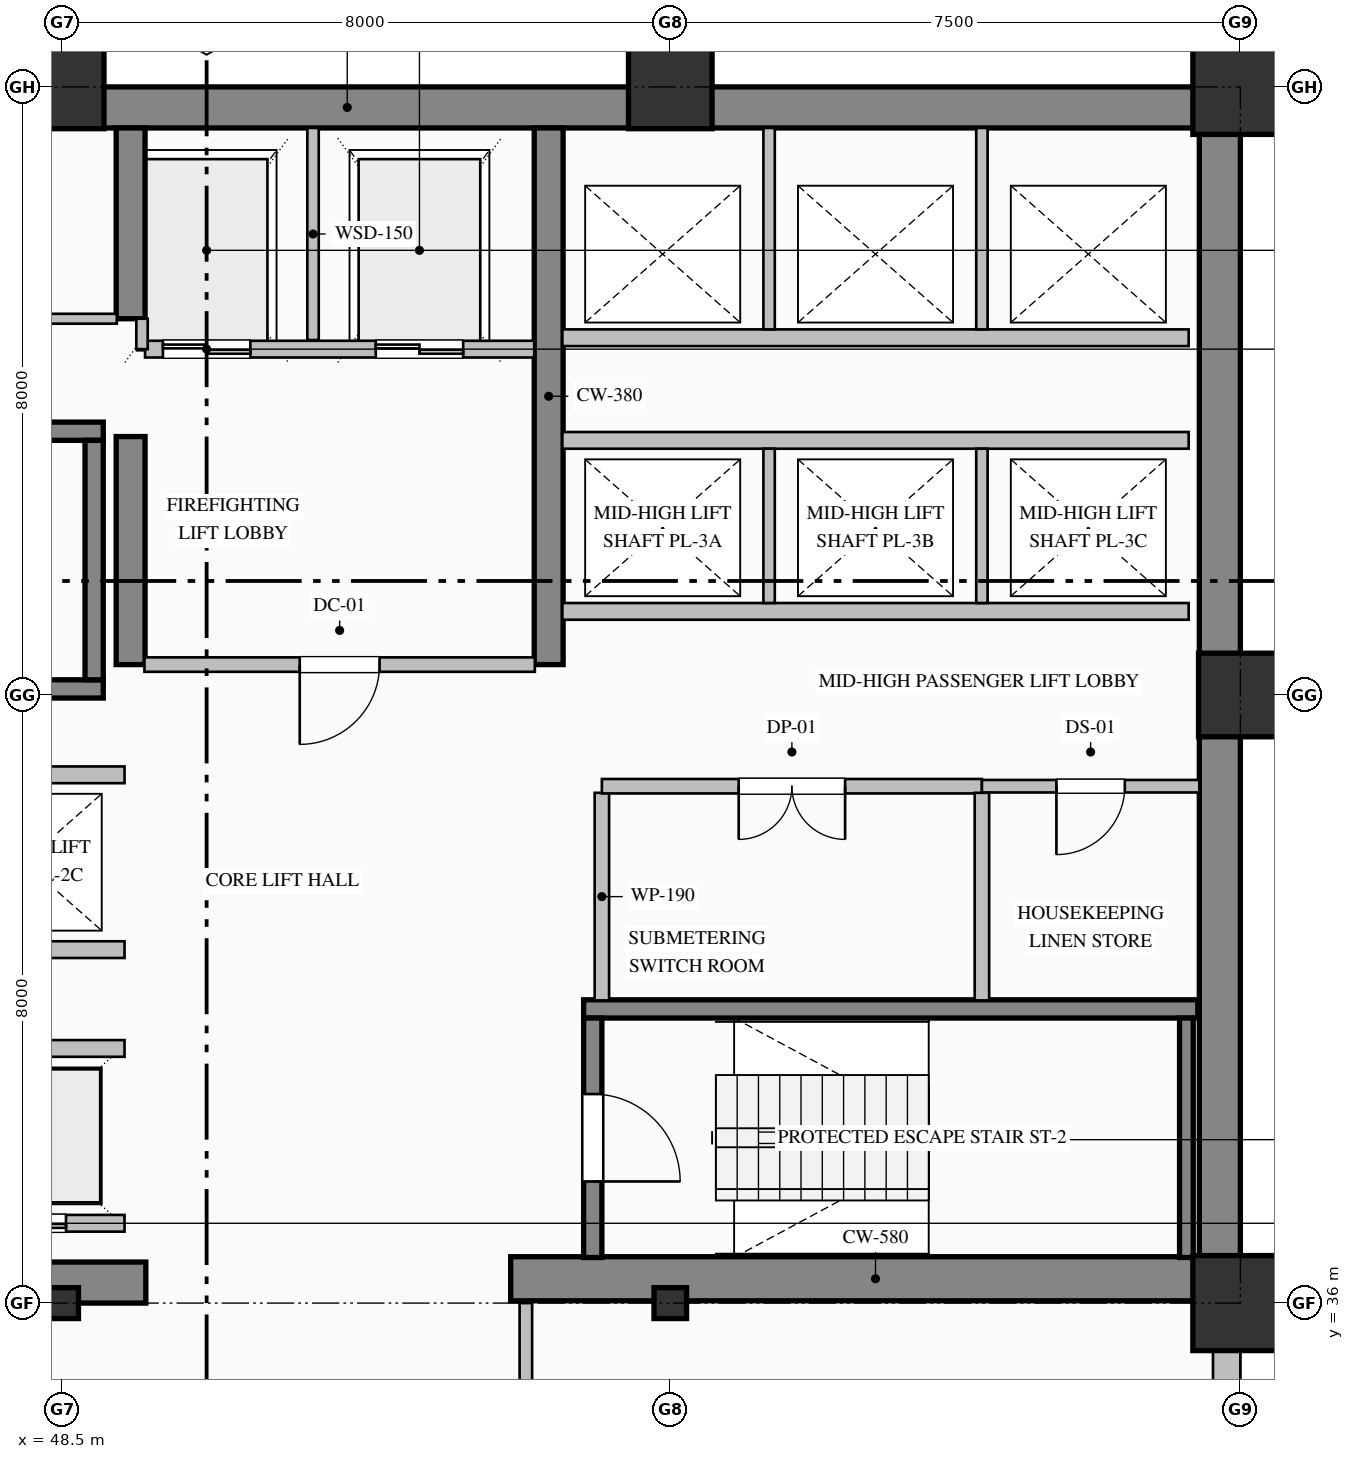
"""IFC4 building model, lengths in metres.
Left out: names, types, materials, properties, quantities, classifications, styles, units other than length and angle.
Written with IfcOpenShell. Run it as: python <this file> out.ifc"""

import sys

from ifc_helpers import new_model, si_unit, direction, frame, frame_2d, origin, origin_2d, place, context, subcontext, project, spatial, rectangle, hollow_rectangle, i_section, extrude, element, fill, save


model = new_model("IFC4")
c1 = context("Model", 3, precision=1e-05, world=origin(), true_north=direction((0.0, 1.0)))
c2 = subcontext(c1, "Body", "Model", "MODEL_VIEW")
j1 = project(units=[si_unit("LENGTHUNIT", "METRE"), si_unit("PLANEANGLEUNIT", "RADIAN")], contexts=[c1])
p1 = place(None, origin())
s1 = spatial("IfcSite", under=j1, at=p1, CompositionType="ELEMENT")
p2 = place(p1, origin())
s2 = spatial("IfcBuilding", under=s1, at=p2, CompositionType="ELEMENT")
p3 = place(p2, frame((0.0, 0.0, 80.2)))
s3 = spatial("IfcBuildingStorey", under=s2, at=p3, CompositionType="ELEMENT", Elevation=80.2)
p4 = place(p3, frame((40.5, 51.73, 0.0), z_axis=(0.0, 0.0, 1.0), x_axis=(1.0, 0.0, 0.0)))
e1 = element("IfcWall", 1, at=p4, inside=s3, PredefinedType="SHEAR", context=c2, shape_type="SweptSolid", body=[
    extrude(rectangle(XDim=23.5, YDim=0.54, at=frame_2d((11.75, 0.0))), origin(), (0.0, 0.0, 1.0), 3.75),
])
p5 = place(p3, frame((63.73, 36.32, 0.0), z_axis=(0.0, 0.0, 1.0), x_axis=(0.0, 1.0, 0.0)))
e2 = element("IfcWall", 2, at=p5, inside=s3, PredefinedType="SHEAR", context=c2, shape_type="SweptSolid", body=[
    extrude(rectangle(XDim=15.14, YDim=0.54, at=frame_2d((7.57, 0.0))), origin(), (0.0, 0.0, 1.0), 3.75),
])
p6 = place(p3, frame((48.2, 36.27, 0.0), z_axis=(0.0, 0.0, 1.0), x_axis=(1.0, 0.0, 0.0)))
e3 = element("IfcWall", 3, at=p6, inside=s3, PredefinedType="SHEAR", context=c2, shape_type="SweptSolid", body=[
    extrude(rectangle(XDim=1.4, YDim=0.54, at=frame_2d((0.7, 0.0))), origin(), (0.0, 0.0, 1.0), 3.75),
])
p7 = place(p3, frame((54.4, 36.32, 0.0), z_axis=(0.0, 0.0, 1.0), x_axis=(1.0, 0.0, 0.0)))
e4 = element("IfcWall", 4, at=p7, inside=s3, PredefinedType="SHEAR", context=c2, shape_type="SweptSolid", body=[
    extrude(rectangle(XDim=9.6, YDim=0.58, at=frame_2d((4.8, 0.0))), origin(), (0.0, 0.0, 1.0), 4.0),
])
p8 = place(p3, frame((49.4, 44.4, 0.0), z_axis=(0.0, 0.0, 1.0), x_axis=(0.0, 1.0, 0.0)))
e5 = element("IfcWall", 5, at=p8, inside=s3, PredefinedType="SHEAR", context=c2, shape_type="SweptSolid", body=[
    extrude(rectangle(XDim=3.0, YDim=0.38, at=frame_2d((1.5, 0.0))), origin(), (0.0, 0.0, 1.0), 3.75),
])
p9 = place(p3, frame((49.4, 48.95, 0.0), z_axis=(0.0, 0.0, 1.0), x_axis=(0.0, 1.0, 0.0)))
e6 = element("IfcWall", 6, at=p9, inside=s3, PredefinedType="SHEAR", context=c2, shape_type="SweptSolid", body=[
    extrude(rectangle(XDim=2.51, YDim=0.38, at=frame_2d((1.255, 0.0))), origin(), (0.0, 0.0, 1.0), 3.75),
])
p10 = place(p3, frame((54.9, 44.4, 0.0), z_axis=(0.0, 0.0, 1.0), x_axis=(0.0, 1.0, 0.0)))
e7 = element("IfcWall", 7, at=p10, inside=s3, PredefinedType="SHEAR", context=c2, shape_type="SweptSolid", body=[
    extrude(rectangle(XDim=7.06, YDim=0.38, at=frame_2d((3.53, 0.0))), origin(), (0.0, 0.0, 1.0), 3.75),
])
p11 = place(p3, frame((48.5, 36.0, 0.0), z_axis=(0.0, 0.0, 1.0), x_axis=(1.0, 0.0, 0.0)))
e8 = element("IfcColumn", 8, at=p11, inside=s3, PredefinedType="COLUMN", context=c2, shape_type="SweptSolid", body=[
    extrude(i_section(OverallWidth=0.407, OverallDepth=0.428, WebThickness=0.02, FlangeThickness=0.035, FilletRadius=0.022, at=origin_2d()), origin(), (0.0, 0.0, 1.0), 4.0),
])
p12 = place(p3, frame((48.5, 52.0, 0.0), z_axis=(0.0, 0.0, 1.0), x_axis=(1.0, 0.0, 0.0)))
e9 = element("IfcColumn", 9, at=p12, inside=s3, PredefinedType="COLUMN", context=c2, shape_type="SweptSolid", body=[
    extrude(hollow_rectangle(XDim=1.1, YDim=1.1, WallThickness=0.04, at=origin_2d()), origin(), (0.0, 0.0, 1.0), 4.0),
])
p13 = place(p3, frame((56.5, 36.0, 0.0), z_axis=(0.0, 0.0, 1.0), x_axis=(1.0, 0.0, 0.0)))
e10 = element("IfcColumn", 10, at=p13, inside=s3, PredefinedType="COLUMN", context=c2, shape_type="SweptSolid", body=[
    extrude(i_section(OverallWidth=0.407, OverallDepth=0.428, WebThickness=0.02, FlangeThickness=0.035, FilletRadius=0.022, at=origin_2d()), origin(), (0.0, 0.0, 1.0), 4.0),
])
p14 = place(p3, frame((56.5, 52.0, 0.0), z_axis=(0.0, 0.0, 1.0), x_axis=(1.0, 0.0, 0.0)))
e11 = element("IfcColumn", 11, at=p14, inside=s3, PredefinedType="COLUMN", context=c2, shape_type="SweptSolid", body=[
    extrude(hollow_rectangle(XDim=1.1, YDim=1.1, WallThickness=0.04, at=origin_2d()), origin(), (0.0, 0.0, 1.0), 4.0),
])
p15 = place(p3, frame((64.0, 36.0, 0.0), z_axis=(0.0, 0.0, 1.0), x_axis=(1.0, 0.0, 0.0)))
e12 = element("IfcColumn", 12, at=p15, inside=s3, PredefinedType="COLUMN", context=c2, shape_type="SweptSolid", body=[
    extrude(hollow_rectangle(XDim=1.25, YDim=1.25, WallThickness=0.045, at=origin_2d()), origin(), (0.0, 0.0, 1.0), 4.0),
])
p16 = place(p3, frame((64.0, 44.0, 0.0), z_axis=(0.0, 0.0, 1.0), x_axis=(1.0, 0.0, 0.0)))
e13 = element("IfcColumn", 13, at=p16, inside=s3, PredefinedType="COLUMN", context=c2, shape_type="SweptSolid", body=[
    extrude(hollow_rectangle(XDim=1.1, YDim=1.1, WallThickness=0.04, at=origin_2d()), origin(), (0.0, 0.0, 1.0), 4.0),
])
p17 = place(p3, frame((64.0, 52.0, 0.0), z_axis=(0.0, 0.0, 1.0), x_axis=(1.0, 0.0, 0.0)))
e14 = element("IfcColumn", 14, at=p17, inside=s3, PredefinedType="COLUMN", context=c2, shape_type="SweptSolid", body=[
    extrude(hollow_rectangle(XDim=1.25, YDim=1.25, WallThickness=0.045, at=origin_2d()), origin(), (0.0, 0.0, 1.0), 4.0),
])
p18 = place(p3, frame((63.82, 36.05, 0.0), z_axis=(0.0, 0.0, 1.0), x_axis=(0.0, -1.0, 0.0)))
e15 = element("IfcWall", 15, at=p18, inside=s3, PredefinedType="SOLIDWALL", context=c2, shape_type="SweptSolid", body=[
    extrude(rectangle(XDim=28.05, YDim=0.36, at=frame_2d((14.025, 0.0))), origin(), (0.0, 0.0, 1.0), 3.25),
])
p19 = place(p18, frame((2.55, 0.0, 0.85)))
e16 = element("IfcOpeningElement", 16, at=p19, cuts=e15, PredefinedType="OPENING", context=c2, shape_type="SweptSolid", body=[
    extrude(rectangle(XDim=2.1, YDim=2.05, at=frame_2d((1.05, 1.025))), frame((0.0, 0.19, 0.0), z_axis=(0.0, -1.0, 0.0), x_axis=(1.0, 0.0, 0.0)), (0.0, 0.0, 1.0), 0.38),
])
p20 = place(p18, frame((13.35, 0.0, 0.85)))
e17 = element("IfcOpeningElement", 17, at=p20, cuts=e15, PredefinedType="OPENING", context=c2, shape_type="SweptSolid", body=[
    extrude(rectangle(XDim=2.1, YDim=2.05, at=frame_2d((1.05, 1.025))), frame((0.0, 0.19, 0.0), z_axis=(0.0, -1.0, 0.0), x_axis=(1.0, 0.0, 0.0)), (0.0, 0.0, 1.0), 0.38),
])
for number, where, z_axis, x_axis in (
    (18, (40.96, 47.47, 0.0), (0.0, 0.0, 1.0), (1.0, 0.0, 0.0)),
    (19, (49.04, 44.08, 0.0), (0.0, 0.0, 1.0), (-1.0, 0.0, 0.0)),
):
    element("IfcWall", number, at=place(p3, frame(where, z_axis=z_axis, x_axis=x_axis)), inside=s3, PredefinedType="SOLIDWALL", context=c2, shape_type="SweptSolid", body=[
        extrude(rectangle(XDim=8.08, YDim=0.24, at=frame_2d((4.04, 0.0))), origin(), (0.0, 0.0, 1.0), 4.0),
    ])
p21 = place(p3, frame((48.92, 44.2, 0.0), z_axis=(0.0, 0.0, 1.0), x_axis=(0.0, 1.0, 0.0)))
e20 = element("IfcWall", 20, at=p21, inside=s3, PredefinedType="SOLIDWALL", context=c2, shape_type="SweptSolid", body=[
    extrude(rectangle(XDim=3.15, YDim=0.24, at=frame_2d((1.575, 0.0))), origin(), (0.0, 0.0, 1.0), 4.0),
])
p22 = place(p3, frame((55.36, 39.87, 0.0), z_axis=(0.0, 0.0, 1.0), x_axis=(1.0, 0.0, 0.0)))
e21 = element("IfcWall", 21, at=p22, inside=s3, PredefinedType="SOLIDWALL", context=c2, shape_type="SweptSolid", body=[
    extrude(rectangle(XDim=8.08, YDim=0.24, at=frame_2d((4.04, 0.0))), origin(), (0.0, 0.0, 1.0), 4.0),
])
p23 = place(p3, frame((55.48, 39.75, 0.0), z_axis=(0.0, 0.0, 1.0), x_axis=(0.0, -1.0, 0.0)))
e22 = element("IfcWall", 22, at=p23, inside=s3, PredefinedType="SOLIDWALL", context=c2, shape_type="SweptSolid", body=[
    extrude(rectangle(XDim=3.15, YDim=0.24, at=frame_2d((1.575, 0.0))), origin(), (0.0, 0.0, 1.0), 4.0),
])
p24 = place(p23, frame((1.0, 0.0, 0.0)))
e23 = element("IfcOpeningElement", 23, at=p24, cuts=e22, PredefinedType="OPENING", context=c2, shape_type="SweptSolid", body=[
    extrude(rectangle(XDim=1.15, YDim=2.2, at=frame_2d((0.575, 1.1))), frame((0.0, 0.13, 0.0), z_axis=(0.0, -1.0, 0.0), x_axis=(1.0, 0.0, 0.0)), (0.0, 0.0, 1.0), 0.26),
])
p25 = place(p3, frame((63.29, 36.6, 0.0), z_axis=(0.0, 0.0, 1.0), x_axis=(0.0, 1.0, 0.0)))
e24 = element("IfcWall", 24, at=p25, inside=s3, PredefinedType="SOLIDWALL", context=c2, shape_type="SweptSolid", body=[
    extrude(rectangle(XDim=3.15, YDim=0.18, at=frame_2d((1.575, 0.0))), origin(), (0.0, 0.0, 1.0), 4.0),
])
p26 = place(p3, frame((54.71, 48.55, 0.0), z_axis=(0.0, 0.0, 1.0), x_axis=(-1.0, 0.0, 0.0)))
e25 = element("IfcWall", 25, at=p26, inside=s3, PredefinedType="PARTITIONING", context=c2, shape_type="SweptSolid", body=[
    extrude(rectangle(XDim=5.12, YDim=0.22, at=frame_2d((2.56, 0.0))), origin(), (0.0, 0.0, 1.0), 3.75),
])
p27 = place(p26, frame((3.735, 0.0, 0.0)))
e26 = element("IfcOpeningElement", 26, at=p27, cuts=e25, PredefinedType="OPENING", context=c2, shape_type="SweptSolid", body=[
    extrude(rectangle(XDim=1.15, YDim=2.2, at=frame_2d((0.575, 1.1))), frame((0.0, 0.12, 0.0), z_axis=(0.0, -1.0, 0.0), x_axis=(1.0, 0.0, 0.0)), (0.0, 0.0, 1.0), 0.24),
])
p28 = place(p26, frame((0.935, 0.0, 0.0)))
e27 = element("IfcOpeningElement", 27, at=p28, cuts=e25, PredefinedType="OPENING", context=c2, shape_type="SweptSolid", body=[
    extrude(rectangle(XDim=1.15, YDim=2.2, at=frame_2d((0.575, 1.1))), frame((0.0, 0.12, 0.0), z_axis=(0.0, -1.0, 0.0), x_axis=(1.0, 0.0, 0.0)), (0.0, 0.0, 1.0), 0.24),
])
p29 = place(p3, frame((51.8, 48.67, 0.0), z_axis=(0.0, 0.0, 1.0), x_axis=(0.0, 1.0, 0.0)))
e28 = element("IfcWall", 28, at=p29, inside=s3, PredefinedType="PARTITIONING", context=c2, shape_type="SweptSolid", body=[
    extrude(rectangle(XDim=2.79, YDim=0.15, at=frame_2d((1.395, 0.0))), origin(), (0.0, 0.0, 1.0), 3.75),
])
p30 = place(p3, frame((49.55, 48.55, 0.0), z_axis=(0.0, 0.0, 1.0), x_axis=(0.0, 1.0, 0.0)))
e29 = element("IfcWall", 29, at=p30, inside=s3, PredefinedType="PARTITIONING", context=c2, shape_type="SweptSolid", body=[
    extrude(rectangle(XDim=0.4, YDim=0.15, at=frame_2d((0.2, 0.0))), origin(), (0.0, 0.0, 1.0), 3.75),
])
p31 = place(p3, frame((49.32, 37.05, 0.0), z_axis=(0.0, 0.0, 1.0), x_axis=(-1.0, 0.0, 0.0)))
e30 = element("IfcWall", 30, at=p31, inside=s3, PredefinedType="PARTITIONING", context=c2, shape_type="SweptSolid", body=[
    extrude(rectangle(XDim=8.24, YDim=0.22, at=frame_2d((4.12, 0.0))), origin(), (0.0, 0.0, 1.0), 3.75),
])
p32 = place(p31, frame((6.37, 0.0, 0.0)))
e31 = element("IfcOpeningElement", 31, at=p32, cuts=e30, PredefinedType="OPENING", context=c2, shape_type="SweptSolid", body=[
    extrude(rectangle(XDim=1.1, YDim=2.2, at=frame_2d((0.55, 1.1))), frame((0.0, 0.12, 0.0), z_axis=(0.0, -1.0, 0.0), x_axis=(1.0, 0.0, 0.0)), (0.0, 0.0, 1.0), 0.24),
])
p33 = place(p31, frame((3.57, 0.0, 0.0)))
e32 = element("IfcOpeningElement", 32, at=p33, cuts=e30, PredefinedType="OPENING", context=c2, shape_type="SweptSolid", body=[
    extrude(rectangle(XDim=1.1, YDim=2.2, at=frame_2d((0.55, 1.1))), frame((0.0, 0.12, 0.0), z_axis=(0.0, -1.0, 0.0), x_axis=(1.0, 0.0, 0.0)), (0.0, 0.0, 1.0), 0.24),
])
p34 = place(p31, frame((0.77, 0.0, 0.0)))
e33 = element("IfcOpeningElement", 33, at=p34, cuts=e30, PredefinedType="OPENING", context=c2, shape_type="SweptSolid", body=[
    extrude(rectangle(XDim=1.1, YDim=2.2, at=frame_2d((0.55, 1.1))), frame((0.0, 0.12, 0.0), z_axis=(0.0, -1.0, 0.0), x_axis=(1.0, 0.0, 0.0)), (0.0, 0.0, 1.0), 0.24),
])
for number, where, z_axis, x_axis in (
    (34, (41.08, 39.35, 0.0), (0.0, 0.0, 1.0), (1.0, 0.0, 0.0)),
    (35, (49.32, 40.65, 0.0), (0.0, 0.0, 1.0), (-1.0, 0.0, 0.0)),
    (36, (41.08, 42.95, 0.0), (0.0, 0.0, 1.0), (1.0, 0.0, 0.0)),
    (37, (63.32, 45.1, 0.0), (0.0, 0.0, 1.0), (-1.0, 0.0, 0.0)),
    (38, (55.08, 47.35, 0.0), (0.0, 0.0, 1.0), (1.0, 0.0, 0.0)),
):
    element("IfcWall", number, at=place(p3, frame(where, z_axis=z_axis, x_axis=x_axis)), inside=s3, PredefinedType="PARTITIONING", context=c2, shape_type="SweptSolid", body=[
        extrude(rectangle(XDim=8.24, YDim=0.22, at=frame_2d((4.12, 0.0))), origin(), (0.0, 0.0, 1.0), 3.75),
    ])
for number, where, z_axis, x_axis in (
    (39, (57.8, 45.21, 0.0), (0.0, 0.0, 1.0), (0.0, 1.0, 0.0)),
    (40, (60.6, 45.21, 0.0), (0.0, 0.0, 1.0), (0.0, 1.0, 0.0)),
):
    element("IfcWall", number, at=place(p3, frame(where, z_axis=z_axis, x_axis=x_axis)), inside=s3, PredefinedType="PARTITIONING", context=c2, shape_type="SweptSolid", body=[
        extrude(rectangle(XDim=2.03, YDim=0.15, at=frame_2d((1.015, 0.0))), origin(), (0.0, 0.0, 1.0), 3.75),
    ])
p35 = place(p3, frame((63.32, 48.7, 0.0), z_axis=(0.0, 0.0, 1.0), x_axis=(-1.0, 0.0, 0.0)))
e41 = element("IfcWall", 41, at=p35, inside=s3, PredefinedType="PARTITIONING", context=c2, shape_type="SweptSolid", body=[
    extrude(rectangle(XDim=8.24, YDim=0.22, at=frame_2d((4.12, 0.0))), origin(), (0.0, 0.0, 1.0), 3.75),
])
for number, where, z_axis, x_axis in (
    (42, (57.8, 48.81, 0.0), (0.0, 0.0, 1.0), (0.0, 1.0, 0.0)),
    (43, (60.6, 48.81, 0.0), (0.0, 0.0, 1.0), (0.0, 1.0, 0.0)),
):
    element("IfcWall", number, at=place(p3, frame(where, z_axis=z_axis, x_axis=x_axis)), inside=s3, PredefinedType="PARTITIONING", context=c2, shape_type="SweptSolid", body=[
        extrude(rectangle(XDim=2.65, YDim=0.15, at=frame_2d((1.325, 0.0))), origin(), (0.0, 0.0, 1.0), 3.75),
    ])
p36 = place(p3, frame((43.5, 48.95, 0.0), z_axis=(0.0, 0.0, 1.0), x_axis=(1.0, 0.0, 0.0)))
e44 = element("IfcWall", 44, at=p36, inside=s3, PredefinedType="PARTITIONING", context=c2, shape_type="SweptSolid", body=[
    extrude(rectangle(XDim=5.718, YDim=0.13, at=frame_2d((2.859, 0.0))), origin(), (0.0, 0.0, 1.0), 3.75),
])
p37 = place(p36, frame((2.399, 0.0, 0.0)))
e45 = element("IfcOpeningElement", 45, at=p37, cuts=e44, PredefinedType="OPENING", context=c2, shape_type="SweptSolid", body=[
    extrude(rectangle(XDim=0.92, YDim=2.15, at=frame_2d((0.46, 1.075))), frame((0.0, 0.075, 0.0), z_axis=(0.0, -1.0, 0.0), x_axis=(1.0, 0.0, 0.0)), (0.0, 0.0, 1.0), 0.15),
])
p38 = place(p3, frame((54.718, 44.4, 0.0), z_axis=(0.0, 0.0, 1.0), x_axis=(-1.0, 0.0, 0.0)))
e46 = element("IfcWall", 46, at=p38, inside=s3, PredefinedType="PARTITIONING", context=c2, shape_type="SweptSolid", body=[
    extrude(rectangle(XDim=5.136, YDim=0.19, at=frame_2d((2.568, 0.0))), origin(), (0.0, 0.0, 1.0), 3.75),
])
p39 = place(p38, frame((2.043, 0.0, 0.0)))
e47 = element("IfcOpeningElement", 47, at=p39, cuts=e46, PredefinedType="OPENING", context=c2, shape_type="SweptSolid", body=[
    extrude(rectangle(XDim=1.05, YDim=2.15, at=frame_2d((0.525, 1.075))), frame((0.0, 0.105, 0.0), z_axis=(0.0, -1.0, 0.0), x_axis=(1.0, 0.0, 0.0)), (0.0, 0.0, 1.0), 0.21),
])
p40 = place(p3, frame((55.6, 42.713, 0.0), z_axis=(0.0, 0.0, 1.0), x_axis=(0.0, -1.0, 0.0)))
e48 = element("IfcWall", 48, at=p40, inside=s3, PredefinedType="PARTITIONING", context=c2, shape_type="SweptSolid", body=[
    extrude(rectangle(XDim=2.731, YDim=0.19, at=frame_2d((1.365, 0.0))), origin(), (0.0, 0.0, 1.0), 3.75),
])
p41 = place(p3, frame((60.6, 42.8, 0.0), z_axis=(0.0, 0.0, 1.0), x_axis=(-1.0, 0.0, 0.0)))
e49 = element("IfcWall", 49, at=p41, inside=s3, PredefinedType="PARTITIONING", context=c2, shape_type="SweptSolid", body=[
    extrude(rectangle(XDim=5.0, YDim=0.19, at=frame_2d((2.5, 0.0))), origin(), (0.0, 0.0, 1.0), 3.75),
])
p42 = place(p41, frame((1.8, 0.0, 0.0)))
e50 = element("IfcOpeningElement", 50, at=p42, cuts=e49, PredefinedType="OPENING", context=c2, shape_type="SweptSolid", body=[
    extrude(rectangle(XDim=1.4, YDim=2.25, at=frame_2d((0.7, 1.125))), frame((0.0, 0.105, 0.0), z_axis=(0.0, -1.0, 0.0), x_axis=(1.0, 0.0, 0.0)), (0.0, 0.0, 1.0), 0.21),
])
p43 = place(p3, frame((63.46, 42.8, 0.0), z_axis=(0.0, 0.0, 1.0), x_axis=(-1.0, 0.0, 0.0)))
e51 = element("IfcWall", 51, at=p43, inside=s3, PredefinedType="PARTITIONING", context=c2, shape_type="SweptSolid", body=[
    extrude(rectangle(XDim=2.86, YDim=0.165, at=frame_2d((1.43, 0.0))), origin(), (0.0, 0.0, 1.0), 3.75),
])
p44 = place(p43, frame((0.98, 0.0, 0.0)))
e52 = element("IfcOpeningElement", 52, at=p44, cuts=e51, PredefinedType="OPENING", context=c2, shape_type="SweptSolid", body=[
    extrude(rectangle(XDim=0.9, YDim=2.15, at=frame_2d((0.45, 1.075))), frame((0.0, 0.093, 0.0), z_axis=(0.0, -1.0, 0.0), x_axis=(1.0, 0.0, 0.0)), (0.0, 0.0, 1.0), 0.185),
])
p45 = place(p3, frame((60.6, 42.713, 0.0), z_axis=(0.0, 0.0, 1.0), x_axis=(0.0, -1.0, 0.0)))
e53 = element("IfcWall", 53, at=p45, inside=s3, PredefinedType="PARTITIONING", context=c2, shape_type="SweptSolid", body=[
    extrude(rectangle(XDim=2.731, YDim=0.19, at=frame_2d((1.365, 0.0))), origin(), (0.0, 0.0, 1.0), 3.75),
])
p46 = place(p3, frame((54.6, 36.0, 0.0), z_axis=(0.0, 0.0, 1.0), x_axis=(0.0, -1.0, 0.0)))
e54 = element("IfcWall", 54, at=p46, inside=s3, PredefinedType="PARTITIONING", context=c2, shape_type="SweptSolid", body=[
    extrude(rectangle(XDim=2.125, YDim=0.165, at=frame_2d((1.063, 0.0))), origin(), (0.0, 0.0, 1.0), 3.75),
])
p47 = place(p24, origin())
e55 = element("IfcDoor", 55, at=p47, inside=s3, OperationType="SINGLE_SWING_RIGHT", PredefinedType="DOOR", context=c2, shape_type="SweptSolid", body=[
    extrude(rectangle(XDim=1.15, YDim=2.2, at=frame_2d((0.575, 1.1))), frame((0.0, 0.025, 0.0), z_axis=(0.0, -1.0, 0.0), x_axis=(1.0, 0.0, 0.0)), (0.0, 0.0, 1.0), 0.05),
])
fill(e23, e55)
p48 = place(p27, origin())
e56 = element("IfcDoor", 56, at=p48, inside=s3, OperationType="DOUBLE_DOOR_SLIDING", PredefinedType="DOOR", context=c2, shape_type="SweptSolid", body=[
    extrude(rectangle(XDim=1.15, YDim=2.2, at=frame_2d((0.575, 1.1))), frame((0.0, 0.025, 0.0), z_axis=(0.0, -1.0, 0.0), x_axis=(1.0, 0.0, 0.0)), (0.0, 0.0, 1.0), 0.05),
])
fill(e26, e56)
p49 = place(p28, origin())
e57 = element("IfcDoor", 57, at=p49, inside=s3, OperationType="DOUBLE_DOOR_SLIDING", PredefinedType="DOOR", context=c2, shape_type="SweptSolid", body=[
    extrude(rectangle(XDim=1.15, YDim=2.2, at=frame_2d((0.575, 1.1))), frame((0.0, 0.025, 0.0), z_axis=(0.0, -1.0, 0.0), x_axis=(1.0, 0.0, 0.0)), (0.0, 0.0, 1.0), 0.05),
])
fill(e27, e57)
p50 = place(p34, origin())
e58 = element("IfcDoor", 58, at=p50, inside=s3, OperationType="DOUBLE_DOOR_SLIDING", PredefinedType="DOOR", context=c2, shape_type="SweptSolid", body=[
    extrude(rectangle(XDim=1.1, YDim=2.2, at=frame_2d((0.55, 1.1))), frame((0.0, 0.025, 0.0), z_axis=(0.0, -1.0, 0.0), x_axis=(1.0, 0.0, 0.0)), (0.0, 0.0, 1.0), 0.05),
])
fill(e33, e58)
p51 = place(p39, origin())
e59 = element("IfcDoor", 59, at=p51, inside=s3, OperationType="SINGLE_SWING_RIGHT", PredefinedType="DOOR", context=c2, shape_type="SweptSolid", body=[
    extrude(rectangle(XDim=1.05, YDim=2.15, at=frame_2d((0.525, 1.075))), frame((0.0, 0.025, 0.0), z_axis=(0.0, -1.0, 0.0), x_axis=(1.0, 0.0, 0.0)), (0.0, 0.0, 1.0), 0.05),
])
fill(e47, e59)
p52 = place(p42, origin())
e60 = element("IfcDoor", 60, at=p52, inside=s3, OperationType="DOUBLE_DOOR_SINGLE_SWING", PredefinedType="DOOR", context=c2, shape_type="SweptSolid", body=[
    extrude(rectangle(XDim=1.4, YDim=2.25, at=frame_2d((0.7, 1.125))), frame((0.0, 0.025, 0.0), z_axis=(0.0, -1.0, 0.0), x_axis=(1.0, 0.0, 0.0)), (0.0, 0.0, 1.0), 0.05),
])
fill(e50, e60)
p53 = place(p44, origin())
e61 = element("IfcDoor", 61, at=p53, inside=s3, OperationType="SINGLE_SWING_RIGHT", PredefinedType="DOOR", context=c2, shape_type="SweptSolid", body=[
    extrude(rectangle(XDim=0.9, YDim=2.15, at=frame_2d((0.45, 1.075))), frame((0.0, 0.025, 0.0), z_axis=(0.0, -1.0, 0.0), x_axis=(1.0, 0.0, 0.0)), (0.0, 0.0, 1.0), 0.05),
])
fill(e52, e61)
save(model, sys.argv[1])
